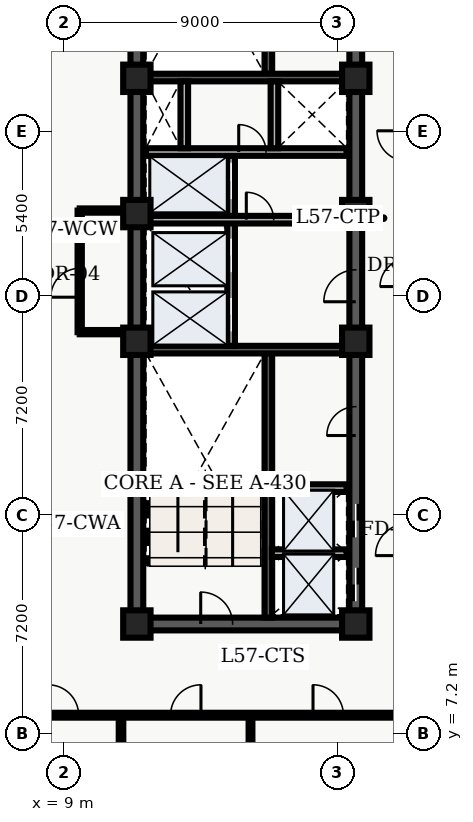
"""IFC4 building model, lengths in metres.
Left out: names, types, materials, properties, quantities, classifications, styles, units other than length and angle.
Written with IfcOpenShell. Run it as: python <this file> out.ifc"""

import sys

from ifc_helpers import new_model, entity, si_unit, converted_unit, direction, frame, origin_with_axes, origin_2d_with_axis, place, context, subcontext, project, spatial, polyline, rectangle, outline, extrude, element, fill, save


model = new_model("IFC4")
c1 = context("Model", 3, precision=1e-05, world=origin_with_axes(), true_north=direction((0.0, 1.0)))
c2 = subcontext(c1, "Body", "Model", "MODEL_VIEW")
j1 = project(units=[si_unit("LENGTHUNIT", "METRE"), converted_unit("PLANEANGLEUNIT", "DEGREE", entity("IfcPlaneAngleMeasure", 0.017), si_unit("PLANEANGLEUNIT", "RADIAN"), dimensions=[0, 0, 0, 0, 0, 0, 0])], contexts=[c1])
p1 = place(None, origin_with_axes())
s1 = spatial("IfcSite", under=j1, at=p1, CompositionType="ELEMENT")
p2 = place(p1, origin_with_axes())
s2 = spatial("IfcBuilding", under=s1, at=p2, CompositionType="ELEMENT")
p3 = place(p2, frame((0.0, 0.0, 232.5), z_axis=(0.0, 0.0, 1.0), x_axis=(1.0, 0.0, 0.0)))
s3 = spatial("IfcBuildingStorey", under=s2, at=p3, CompositionType="ELEMENT", Elevation=232.5)
p4 = place(p3, frame((11.4, 10.8, 0.0), z_axis=(0.0, 0.0, 1.0), x_axis=(0.0, 1.0, 0.0)))
e1 = element("IfcWall", 1, at=p4, inside=s3, PredefinedType="SHEAR", context=c2, shape_type="SweptSolid", body=[
    extrude(outline(polyline([(0.0, -0.21), (27.0, -0.21), (27.0, 0.21), (0.0, 0.21), (0.0, -0.21)])), origin_with_axes(), (0.0, 0.0, 1.0), 3.66),
])
p5 = place(p3, frame((11.4, 10.8, 0.0), z_axis=(0.0, 0.0, 1.0), x_axis=(1.0, 0.0, 0.0)))
e2 = element("IfcWall", 2, at=p5, inside=s3, PredefinedType="SHEAR", context=c2, shape_type="SweptSolid", body=[
    extrude(outline(polyline([(0.0, -0.21), (7.2, -0.21), (7.2, 0.21), (0.0, 0.21), (0.0, -0.21)])), origin_with_axes(), (0.0, 0.0, 1.0), 3.66),
])
p6 = place(p5, frame((2.625, 0.0, 0.0), z_axis=(0.0, 0.0, 1.0), x_axis=(1.0, 0.0, 0.0)))
e3 = element("IfcOpeningElement", 3, at=p6, cuts=e2, PredefinedType="OPENING", context=c2, shape_type="SweptSolid", body=[
    extrude(rectangle(XDim=1.05, YDim=0.44, at=origin_2d_with_axis()), origin_with_axes(), (0.0, 0.0, 1.0), 2.15),
])
p7 = place(p3, frame((18.6, 10.8, 0.0), z_axis=(0.0, 0.0, 1.0), x_axis=(0.0, 1.0, 0.0)))
e4 = element("IfcWall", 4, at=p7, inside=s3, PredefinedType="SHEAR", context=c2, shape_type="SweptSolid", body=[
    extrude(outline(polyline([(0.0, -0.21), (13.5, -0.21), (13.5, 0.21), (0.0, 0.21), (0.0, -0.21)])), origin_with_axes(), (0.0, 0.0, 1.0), 3.66),
])
p8 = place(p7, frame((1.3, 0.0, 0.0), z_axis=(0.0, 0.0, 1.0), x_axis=(1.0, 0.0, 0.0)))
e5 = element("IfcOpeningElement", 5, at=p8, cuts=e4, PredefinedType="OPENING", context=c2, shape_type="SweptSolid", body=[
    extrude(rectangle(XDim=1.1, YDim=0.44, at=origin_2d_with_axis()), origin_with_axes(), (0.0, 0.0, 1.0), 2.15),
])
p9 = place(p7, frame((3.4, 0.0, 0.0), z_axis=(0.0, 0.0, 1.0), x_axis=(1.0, 0.0, 0.0)))
e6 = element("IfcOpeningElement", 6, at=p9, cuts=e4, PredefinedType="OPENING", context=c2, shape_type="SweptSolid", body=[
    extrude(rectangle(XDim=1.1, YDim=0.44, at=origin_2d_with_axis()), origin_with_axes(), (0.0, 0.0, 1.0), 2.15),
])
p10 = place(p7, frame((11.125, 0.0, 0.0), z_axis=(0.0, 0.0, 1.0), x_axis=(1.0, 0.0, 0.0)))
e7 = element("IfcOpeningElement", 7, at=p10, cuts=e4, PredefinedType="OPENING", context=c2, shape_type="SweptSolid", body=[
    extrude(rectangle(XDim=1.05, YDim=0.44, at=origin_2d_with_axis()), origin_with_axes(), (0.0, 0.0, 1.0), 2.15),
])
p11 = place(p7, frame((6.675, 0.0, 0.0), z_axis=(0.0, 0.0, 1.0), x_axis=(1.0, 0.0, 0.0)))
e8 = element("IfcOpeningElement", 8, at=p11, cuts=e4, PredefinedType="OPENING", context=c2, shape_type="SweptSolid", body=[
    extrude(rectangle(XDim=0.95, YDim=0.44, at=origin_2d_with_axis()), origin_with_axes(), (0.0, 0.0, 1.0), 2.15),
])
p12 = place(p3, frame((18.6, 24.3, 0.0), z_axis=(0.0, 0.0, 1.0), x_axis=(0.0, 1.0, 0.0)))
e9 = element("IfcWall", 9, at=p12, inside=s3, PredefinedType="SHEAR", context=c2, shape_type="SweptSolid", body=[
    extrude(outline(polyline([(0.0, -0.21), (13.5, -0.21), (13.5, 0.21), (0.0, 0.21), (0.0, -0.21)])), origin_with_axes(), (0.0, 0.0, 1.0), 3.66),
])
p13 = place(p12, frame((8.525, 0.0, 0.0), z_axis=(0.0, 0.0, 1.0), x_axis=(1.0, 0.0, 0.0)))
e10 = element("IfcOpeningElement", 10, at=p13, cuts=e9, PredefinedType="OPENING", context=c2, shape_type="SweptSolid", body=[
    extrude(rectangle(XDim=1.05, YDim=0.44, at=origin_2d_with_axis()), origin_with_axes(), (0.0, 0.0, 1.0), 2.15),
])
p14 = place(p3, frame((15.725, 11.01, 0.0), z_axis=(0.0, 0.0, 1.0), x_axis=(0.0, 1.0, 0.0)))
e11 = element("IfcWall", 11, at=p14, inside=s3, PredefinedType="SHEAR", context=c2, shape_type="SweptSolid", body=[
    extrude(outline(polyline([(0.0, -0.125), (8.69, -0.125), (8.69, 0.125), (0.0, 0.125), (0.0, -0.125)])), origin_with_axes(), (0.0, 0.0, 1.0), 3.66),
])
p15 = place(p3, frame((11.61, 19.825, 0.0), z_axis=(0.0, 0.0, 1.0), x_axis=(1.0, 0.0, 0.0)))
e12 = element("IfcWall", 12, at=p15, inside=s3, PredefinedType="SHEAR", context=c2, shape_type="SweptSolid", body=[
    extrude(outline(polyline([(0.0, -0.125), (6.78, -0.125), (6.78, 0.125), (0.0, 0.125), (0.0, -0.125)])), origin_with_axes(), (0.0, 0.0, 1.0), 3.66),
])
p16 = place(p3, frame((15.725, 28.9, 0.0), z_axis=(0.0, 0.0, 1.0), x_axis=(0.0, 1.0, 0.0)))
e13 = element("IfcWall", 13, at=p16, inside=s3, PredefinedType="SHEAR", context=c2, shape_type="SweptSolid", body=[
    extrude(outline(polyline([(0.0, -0.125), (8.69, -0.125), (8.69, 0.125), (0.0, 0.125), (0.0, -0.125)])), origin_with_axes(), (0.0, 0.0, 1.0), 3.66),
])
p17 = place(p3, frame((11.61, 28.775, 0.0), z_axis=(0.0, 0.0, 1.0), x_axis=(1.0, 0.0, 0.0)))
e14 = element("IfcWall", 14, at=p17, inside=s3, PredefinedType="SHEAR", context=c2, shape_type="SweptSolid", body=[
    extrude(outline(polyline([(0.0, -0.125), (6.78, -0.125), (6.78, 0.125), (0.0, 0.125), (0.0, -0.125)])), origin_with_axes(), (0.0, 0.0, 1.0), 3.66),
])
p18 = place(p3, frame((14.5, 19.95, 0.0), z_axis=(0.0, 0.0, 1.0), x_axis=(0.0, 1.0, 0.0)))
e15 = element("IfcWall", 15, at=p18, inside=s3, PredefinedType="SOLIDWALL", context=c2, shape_type="SweptSolid", body=[
    extrude(outline(polyline([(0.0, -0.125), (6.25, -0.125), (6.25, 0.125), (0.0, 0.125), (0.0, -0.125)])), origin_with_axes(), (0.0, 0.0, 1.0), 2.7),
])
p19 = place(p18, frame((1.025, 0.0, 0.0), z_axis=(0.0, 0.0, 1.0), x_axis=(1.0, 0.0, 0.0)))
e16 = element("IfcOpeningElement", 16, at=p19, cuts=e15, PredefinedType="OPENING", context=c2, shape_type="SweptSolid", body=[
    extrude(rectangle(XDim=1.1, YDim=0.27, at=origin_2d_with_axis()), origin_with_axes(), (0.0, 0.0, 1.0), 2.15),
])
p20 = place(p18, frame((2.975, 0.0, 0.0), z_axis=(0.0, 0.0, 1.0), x_axis=(1.0, 0.0, 0.0)))
e17 = element("IfcOpeningElement", 17, at=p20, cuts=e15, PredefinedType="OPENING", context=c2, shape_type="SweptSolid", body=[
    extrude(rectangle(XDim=1.1, YDim=0.27, at=origin_2d_with_axis()), origin_with_axes(), (0.0, 0.0, 1.0), 2.15),
])
p21 = place(p18, frame((5.425, 0.0, 0.0), z_axis=(0.0, 0.0, 1.0), x_axis=(1.0, 0.0, 0.0)))
e18 = element("IfcOpeningElement", 18, at=p21, cuts=e15, PredefinedType="OPENING", context=c2, shape_type="SweptSolid", body=[
    extrude(rectangle(XDim=1.2, YDim=0.27, at=origin_2d_with_axis()), origin_with_axes(), (0.0, 0.0, 1.0), 2.15),
])
p22 = place(p3, frame((11.7, 24.1, 0.0), z_axis=(0.0, 0.0, 1.0), x_axis=(1.0, 0.0, 0.0)))
e19 = element("IfcWall", 19, at=p22, inside=s3, PredefinedType="SOLIDWALL", context=c2, shape_type="SweptSolid", body=[
    extrude(outline(polyline([(0.0, -0.125), (6.6, -0.125), (6.6, 0.125), (0.0, 0.125), (0.0, -0.125)])), origin_with_axes(), (0.0, 0.0, 1.0), 2.7),
])
p23 = place(p22, frame((3.75, 0.0, 0.0), z_axis=(0.0, 0.0, 1.0), x_axis=(1.0, 0.0, 0.0)))
e20 = element("IfcOpeningElement", 20, at=p23, cuts=e19, PredefinedType="OPENING", context=c2, shape_type="SweptSolid", body=[
    extrude(rectangle(XDim=0.9, YDim=0.27, at=origin_2d_with_axis()), origin_with_axes(), (0.0, 0.0, 1.0), 2.15),
])
p24 = place(p3, frame((11.7, 26.325, 0.0), z_axis=(0.0, 0.0, 1.0), x_axis=(1.0, 0.0, 0.0)))
e21 = element("IfcWall", 21, at=p24, inside=s3, PredefinedType="SOLIDWALL", context=c2, shape_type="SweptSolid", body=[
    extrude(outline(polyline([(0.0, -0.125), (6.6, -0.125), (6.6, 0.125), (0.0, 0.125), (0.0, -0.125)])), origin_with_axes(), (0.0, 0.0, 1.0), 2.7),
])
p25 = place(p24, frame((3.5, 0.0, 0.0), z_axis=(0.0, 0.0, 1.0), x_axis=(1.0, 0.0, 0.0)))
e22 = element("IfcOpeningElement", 22, at=p25, cuts=e21, PredefinedType="OPENING", context=c2, shape_type="SweptSolid", body=[
    extrude(rectangle(XDim=0.9, YDim=0.27, at=origin_2d_with_axis()), origin_with_axes(), (0.0, 0.0, 1.0), 2.15),
])
for number, where, z_axis, x_axis in (
    (23, (12.96, 26.45, 0.0), (0.0, 0.0, 1.0), (0.0, 1.0, 0.0)),
    (24, (15.925, 26.45, 0.0), (0.0, 0.0, 1.0), (0.0, 1.0, 0.0)),
):
    element("IfcWall", number, at=place(p3, frame(where, z_axis=z_axis, x_axis=x_axis)), inside=s3, PredefinedType="SOLIDWALL", context=c2, shape_type="SweptSolid", body=[
        extrude(outline(polyline([(0.0, -0.125), (2.2, -0.125), (2.2, 0.125), (0.0, 0.125), (0.0, -0.125)])), origin_with_axes(), (0.0, 0.0, 1.0), 2.7),
    ])
for number, where, z_axis, x_axis in (
    (25, (11.4, 10.8, 0.0), (0.0, 0.0, 1.0), (1.0, 0.0, 0.0)),
    (26, (11.4, 20.1, 0.0), (0.0, 0.0, 1.0), (1.0, 0.0, 0.0)),
    (27, (11.4, 24.3, 0.0), (0.0, 0.0, 1.0), (1.0, 0.0, 0.0)),
    (28, (11.4, 28.75, 0.0), (0.0, 0.0, 1.0), (1.0, 0.0, 0.0)),
    (29, (18.6, 10.8, 0.0), (0.0, 0.0, 1.0), (1.0, 0.0, 0.0)),
    (30, (18.6, 20.1, 0.0), (0.0, 0.0, 1.0), (1.0, 0.0, 0.0)),
    (31, (18.6, 24.3, 0.0), (0.0, 0.0, 1.0), (1.0, 0.0, 0.0)),
    (32, (18.6, 28.75, 0.0), (0.0, 0.0, 1.0), (1.0, 0.0, 0.0)),
):
    element("IfcColumn", number, at=place(p3, frame(where, z_axis=z_axis, x_axis=x_axis)), inside=s3, PredefinedType="COLUMN", context=c2, shape_type="SweptSolid", body=[
        extrude(rectangle(XDim=0.9, YDim=0.9, at=origin_2d_with_axis()), origin_with_axes(), (0.0, 0.0, 1.0), 3.9),
    ])
for number, where, z_axis, x_axis in (
    (33, (15.84, 13.13, 0.0), (0.0, 0.0, 1.0), (1.0, 0.0, 0.0)),
    (34, (15.84, 15.27, 0.0), (0.0, 0.0, 1.0), (1.0, 0.0, 0.0)),
):
    element("IfcWall", number, at=place(p3, frame(where, z_axis=z_axis, x_axis=x_axis)), inside=s3, PredefinedType="SOLIDWALL", context=c2, shape_type="SweptSolid", body=[
        extrude(outline(polyline([(0.0, -0.125), (2.46, -0.125), (2.46, 0.125), (0.0, 0.125), (0.0, -0.125)])), origin_with_axes(), (0.0, 0.0, 1.0), 2.7),
    ])
p26 = place(p3, frame((9.52, 20.4, 0.0), z_axis=(0.0, 0.0, 1.0), x_axis=(0.0, 1.0, 0.0)))
e35 = element("IfcWall", 35, at=p26, inside=s3, PredefinedType="PARTITIONING", context=c2, shape_type="SweptSolid", body=[
    extrude(outline(polyline([(0.0, -0.07), (4.0, -0.07), (4.0, 0.07), (0.0, 0.07), (0.0, -0.07)])), origin_with_axes(), (0.0, 0.0, 1.0), 2.7),
])
p27 = place(p26, frame((1.625, 0.0, 0.0), z_axis=(0.0, 0.0, 1.0), x_axis=(1.0, 0.0, 0.0)))
e36 = element("IfcOpeningElement", 36, at=p27, cuts=e35, PredefinedType="OPENING", context=c2, shape_type="SweptSolid", body=[
    extrude(rectangle(XDim=0.95, YDim=0.16, at=origin_2d_with_axis()), origin_with_axes(), (0.0, 0.0, 1.0), 2.15),
])
for number, where, z_axis, x_axis in (
    (37, (9.52, 20.4, 0.0), (0.0, 0.0, 1.0), (1.0, 0.0, 0.0)),
    (38, (9.52, 24.4, 0.0), (0.0, 0.0, 1.0), (1.0, 0.0, 0.0)),
):
    element("IfcWall", number, at=place(p3, frame(where, z_axis=z_axis, x_axis=x_axis)), inside=s3, PredefinedType="PARTITIONING", context=c2, shape_type="SweptSolid", body=[
        extrude(outline(polyline([(0.0, -0.07), (1.58, -0.07), (1.58, 0.07), (0.0, 0.07), (0.0, -0.07)])), origin_with_axes(), (0.0, 0.0, 1.0), 2.7),
    ])
p28 = place(p3, frame((7.1, 7.8, 0.0), z_axis=(0.0, 0.0, 1.0), x_axis=(1.0, 0.0, 0.0)))
e39 = element("IfcWall", 39, at=p28, inside=s3, PredefinedType="PARTITIONING", context=c2, shape_type="SweptSolid", body=[
    extrude(outline(polyline([(0.0, -0.08), (13.2, -0.08), (13.2, 0.08), (0.0, 0.08), (0.0, -0.08)])), origin_with_axes(), (0.0, 0.0, 1.0), 2.7),
])
p29 = place(p28, frame((1.885, 0.0, 0.0), z_axis=(0.0, 0.0, 1.0), x_axis=(1.0, 0.0, 0.0)))
e40 = element("IfcOpeningElement", 40, at=p29, cuts=e39, PredefinedType="OPENING", context=c2, shape_type="SweptSolid", body=[
    extrude(rectangle(XDim=1.0, YDim=0.18, at=origin_2d_with_axis()), origin_with_axes(), (0.0, 0.0, 1.0), 2.15),
])
p30 = place(p28, frame((5.909, 0.0, 0.0), z_axis=(0.0, 0.0, 1.0), x_axis=(1.0, 0.0, 0.0)))
e41 = element("IfcOpeningElement", 41, at=p30, cuts=e39, PredefinedType="OPENING", context=c2, shape_type="SweptSolid", body=[
    extrude(rectangle(XDim=1.0, YDim=0.18, at=origin_2d_with_axis()), origin_with_axes(), (0.0, 0.0, 1.0), 2.15),
])
p31 = place(p28, frame((10.594, 0.0, 0.0), z_axis=(0.0, 0.0, 1.0), x_axis=(1.0, 0.0, 0.0)))
e42 = element("IfcOpeningElement", 42, at=p31, cuts=e39, PredefinedType="OPENING", context=c2, shape_type="SweptSolid", body=[
    extrude(rectangle(XDim=1.0, YDim=0.18, at=origin_2d_with_axis()), origin_with_axes(), (0.0, 0.0, 1.0), 2.15),
])
p32 = place(p3, frame((10.879, 0.335, 0.0), z_axis=(0.0, 0.0, 1.0), x_axis=(0.0, 1.0, 0.0)))
e43 = element("IfcWall", 43, at=p32, inside=s3, PredefinedType="PARTITIONING", context=c2, shape_type="SweptSolid", body=[
    extrude(outline(polyline([(0.0, -0.075), (7.365, -0.075), (7.365, 0.075), (0.0, 0.075), (0.0, -0.075)])), origin_with_axes(), (0.0, 0.0, 1.0), 2.7),
])
p33 = place(p3, frame((15.138, 0.335, 0.0), z_axis=(0.0, 0.0, 1.0), x_axis=(0.0, 1.0, 0.0)))
e44 = element("IfcWall", 44, at=p33, inside=s3, PredefinedType="PARTITIONING", context=c2, shape_type="SweptSolid", body=[
    extrude(outline(polyline([(0.0, -0.062), (7.365, -0.062), (7.365, 0.062), (0.0, 0.062), (0.0, -0.062)])), origin_with_axes(), (0.0, 0.0, 1.0), 2.7),
])
p34 = place(p7, frame((1.3, 0.0, 0.0), z_axis=(0.0, 0.0, 1.0), x_axis=(1.0, 0.0, 0.0)))
e45 = element("IfcDoor", 45, at=p34, inside=s3, OperationType="SLIDING_TO_LEFT", PredefinedType="DOOR", context=c2, shape_type="SweptSolid", body=[
    extrude(rectangle(XDim=1.1, YDim=0.09, at=origin_2d_with_axis()), origin_with_axes(), (0.0, 0.0, 1.0), 2.15),
])
fill(e5, e45)
p35 = place(p7, frame((3.4, 0.0, 0.0), z_axis=(0.0, 0.0, 1.0), x_axis=(1.0, 0.0, 0.0)))
e46 = element("IfcDoor", 46, at=p35, inside=s3, OperationType="SLIDING_TO_RIGHT", PredefinedType="DOOR", context=c2, shape_type="SweptSolid", body=[
    extrude(rectangle(XDim=1.1, YDim=0.09, at=origin_2d_with_axis()), origin_with_axes(), (0.0, 0.0, 1.0), 2.15),
])
fill(e6, e46)
p36 = place(p18, frame((1.025, 0.0, 0.0), z_axis=(0.0, 0.0, 1.0), x_axis=(1.0, 0.0, 0.0)))
e47 = element("IfcDoor", 47, at=p36, inside=s3, OperationType="SLIDING_TO_LEFT", PredefinedType="DOOR", context=c2, shape_type="SweptSolid", body=[
    extrude(rectangle(XDim=1.1, YDim=0.09, at=origin_2d_with_axis()), origin_with_axes(), (0.0, 0.0, 1.0), 2.15),
])
fill(e16, e47)
p37 = place(p18, frame((2.975, 0.0, 0.0), z_axis=(0.0, 0.0, 1.0), x_axis=(1.0, 0.0, 0.0)))
e48 = element("IfcDoor", 48, at=p37, inside=s3, OperationType="SLIDING_TO_RIGHT", PredefinedType="DOOR", context=c2, shape_type="SweptSolid", body=[
    extrude(rectangle(XDim=1.1, YDim=0.09, at=origin_2d_with_axis()), origin_with_axes(), (0.0, 0.0, 1.0), 2.15),
])
fill(e17, e48)
p38 = place(p18, frame((5.425, 0.0, 0.0), z_axis=(0.0, 0.0, 1.0), x_axis=(1.0, 0.0, 0.0)))
e49 = element("IfcDoor", 49, at=p38, inside=s3, OperationType="DOUBLE_DOOR_SLIDING", PredefinedType="DOOR", context=c2, shape_type="SweptSolid", body=[
    extrude(rectangle(XDim=1.2, YDim=0.09, at=origin_2d_with_axis()), origin_with_axes(), (0.0, 0.0, 1.0), 2.15),
])
fill(e18, e49)
p39 = place(p5, frame((2.625, 0.0, 0.0), z_axis=(0.0, 0.0, 1.0), x_axis=(1.0, 0.0, 0.0)))
e50 = element("IfcDoor", 50, at=p39, inside=s3, OperationType="SINGLE_SWING_LEFT", PredefinedType="DOOR", context=c2, shape_type="SweptSolid", body=[
    extrude(rectangle(XDim=1.05, YDim=0.09, at=origin_2d_with_axis()), origin_with_axes(), (0.0, 0.0, 1.0), 2.15),
])
fill(e3, e50)
p40 = place(p7, frame((11.125, 0.0, 0.0), z_axis=(0.0, 0.0, 1.0), x_axis=(1.0, 0.0, 0.0)))
e51 = element("IfcDoor", 51, at=p40, inside=s3, OperationType="SINGLE_SWING_LEFT", PredefinedType="DOOR", context=c2, shape_type="SweptSolid", body=[
    extrude(rectangle(XDim=1.05, YDim=0.09, at=origin_2d_with_axis()), origin_with_axes(), (0.0, 0.0, 1.0), 2.15),
])
fill(e7, e51)
p41 = place(p22, frame((3.75, 0.0, 0.0), z_axis=(0.0, 0.0, 1.0), x_axis=(1.0, 0.0, 0.0)))
e52 = element("IfcDoor", 52, at=p41, inside=s3, OperationType="SINGLE_SWING_LEFT", PredefinedType="DOOR", context=c2, shape_type="SweptSolid", body=[
    extrude(rectangle(XDim=0.9, YDim=0.09, at=origin_2d_with_axis()), origin_with_axes(), (0.0, 0.0, 1.0), 2.15),
])
fill(e20, e52)
p42 = place(p24, frame((3.5, 0.0, 0.0), z_axis=(0.0, 0.0, 1.0), x_axis=(1.0, 0.0, 0.0)))
e53 = element("IfcDoor", 53, at=p42, inside=s3, OperationType="SINGLE_SWING_LEFT", PredefinedType="DOOR", context=c2, shape_type="SweptSolid", body=[
    extrude(rectangle(XDim=0.9, YDim=0.09, at=origin_2d_with_axis()), origin_with_axes(), (0.0, 0.0, 1.0), 2.15),
])
fill(e22, e53)
p43 = place(p7, frame((6.675, 0.0, 0.0), z_axis=(0.0, 0.0, 1.0), x_axis=(1.0, 0.0, 0.0)))
e54 = element("IfcDoor", 54, at=p43, inside=s3, OperationType="SINGLE_SWING_LEFT", PredefinedType="DOOR", context=c2, shape_type="SweptSolid", body=[
    extrude(rectangle(XDim=0.95, YDim=0.09, at=origin_2d_with_axis()), origin_with_axes(), (0.0, 0.0, 1.0), 2.15),
])
fill(e8, e54)
p44 = place(p26, frame((1.625, 0.0, 0.0), z_axis=(0.0, 0.0, 1.0), x_axis=(1.0, 0.0, 0.0)))
e55 = element("IfcDoor", 55, at=p44, inside=s3, OperationType="SINGLE_SWING_LEFT", PredefinedType="DOOR", context=c2, shape_type="SweptSolid", body=[
    extrude(rectangle(XDim=0.95, YDim=0.084, at=origin_2d_with_axis()), origin_with_axes(), (0.0, 0.0, 1.0), 2.15),
])
fill(e36, e55)
p45 = place(p28, frame((1.885, 0.0, 0.0), z_axis=(0.0, 0.0, 1.0), x_axis=(1.0, 0.0, 0.0)))
e56 = element("IfcDoor", 56, at=p45, inside=s3, OperationType="SINGLE_SWING_LEFT", PredefinedType="DOOR", context=c2, shape_type="SweptSolid", body=[
    extrude(rectangle(XDim=1.0, YDim=0.09, at=origin_2d_with_axis()), origin_with_axes(), (0.0, 0.0, 1.0), 2.15),
])
fill(e40, e56)
p46 = place(p28, frame((5.909, 0.0, 0.0), z_axis=(0.0, 0.0, 1.0), x_axis=(1.0, 0.0, 0.0)))
e57 = element("IfcDoor", 57, at=p46, inside=s3, OperationType="SINGLE_SWING_RIGHT", PredefinedType="DOOR", context=c2, shape_type="SweptSolid", body=[
    extrude(rectangle(XDim=1.0, YDim=0.09, at=origin_2d_with_axis()), origin_with_axes(), (0.0, 0.0, 1.0), 2.15),
])
fill(e41, e57)
p47 = place(p28, frame((10.594, 0.0, 0.0), z_axis=(0.0, 0.0, 1.0), x_axis=(1.0, 0.0, 0.0)))
e58 = element("IfcDoor", 58, at=p47, inside=s3, OperationType="SINGLE_SWING_LEFT", PredefinedType="DOOR", context=c2, shape_type="SweptSolid", body=[
    extrude(rectangle(XDim=1.0, YDim=0.09, at=origin_2d_with_axis()), origin_with_axes(), (0.0, 0.0, 1.0), 2.15),
])
fill(e42, e58)
save(model, sys.argv[1])
